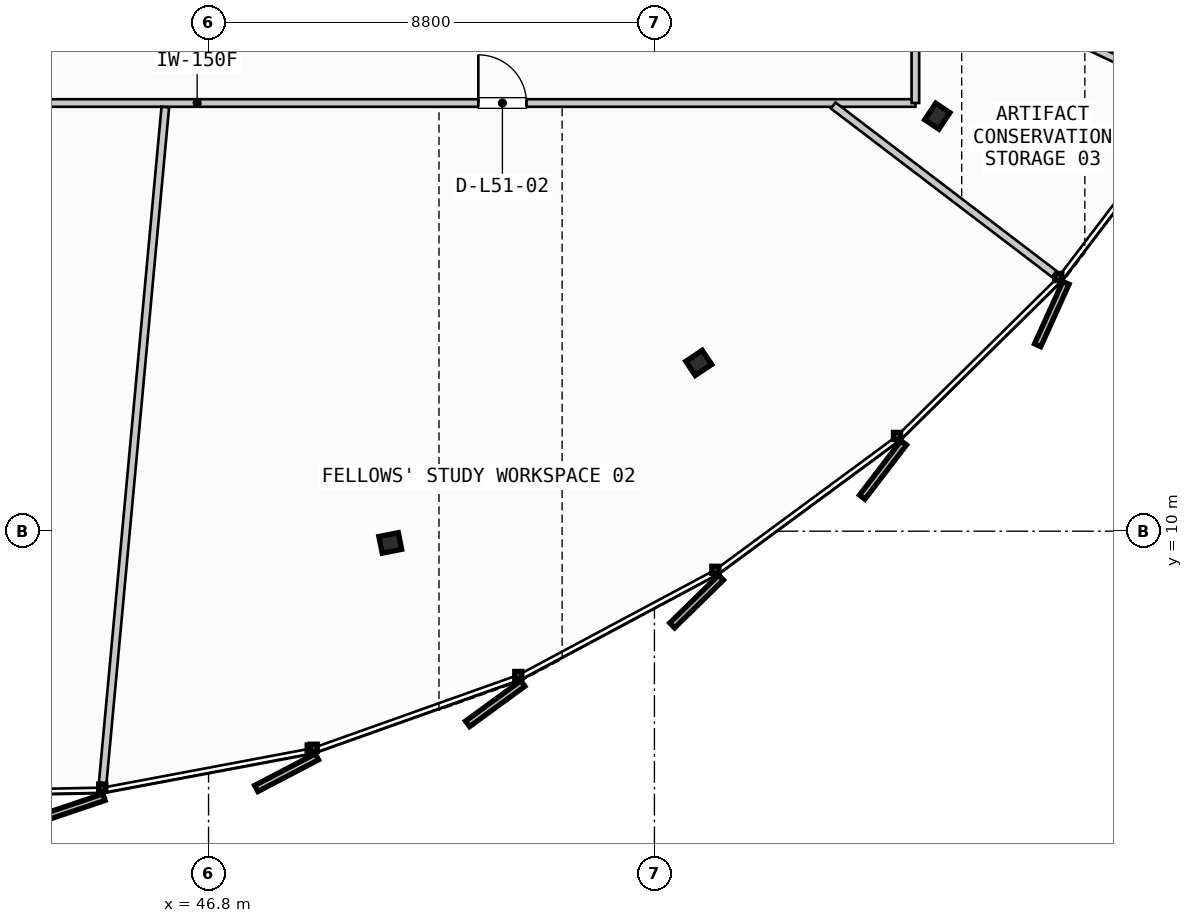
"""IFC4 building model, lengths in metres.
Left out: names, types, materials, properties, quantities, classifications, styles, units other than length and angle.
Written with IfcOpenShell. Run it as: python <this file> out.ifc"""

import sys

from ifc_helpers import new_model, si_unit, direction, frame, frame_2d, origin, origin_2d, place, context, subcontext, project, spatial, rectangle, i_section, extrude, source, transform, mapped, element, fill, save


model = new_model("IFC4")
c1 = context("Model", 3, precision=1e-05, world=origin(), true_north=direction((0.0, 1.0)))
c2 = subcontext(c1, "Body", "Model", "MODEL_VIEW")
j1 = project(units=[si_unit("LENGTHUNIT", "METRE"), si_unit("PLANEANGLEUNIT", "RADIAN")], contexts=[c1])
p1 = place(None, origin())
s1 = spatial("IfcSite", under=j1, at=p1, CompositionType="ELEMENT")
p2 = place(p1, origin())
s2 = spatial("IfcBuilding", under=s1, at=p2, CompositionType="ELEMENT")
p3 = place(p2, frame((0.0, 0.0, 197.4)))
s3 = spatial("IfcBuildingStorey", under=s2, at=p3, CompositionType="ELEMENT", Elevation=197.4)
m1 = source(origin(), c2, "Body", "SweptSolid", [
    extrude(i_section(OverallWidth=0.391, OverallDepth=0.335, WebThickness=0.023, FlangeThickness=0.034, FilletRadius=0.015, at=origin_2d()), origin(), (0.0, 0.0, 1.0), 3.26),
])
for number, where, z_axis, x_axis in (
    (1, (50.387, 9.769, 0.0), (0.0, 0.0, 1.0), (0.195, -0.981, 0.0)),
    (2, (56.475, 13.321, 0.0), (0.0, 0.0, 1.0), (0.556, -0.831, 0.0)),
    (3, (61.183, 18.19, 0.0), (0.0, 0.0, 1.0), (0.831, -0.556, 0.0)),
):
    element("IfcColumn", number, at=place(p3, frame(where, z_axis=z_axis, x_axis=x_axis)), inside=s3, PredefinedType="COLUMN", context=c2, shape_type="MappedRepresentation", body=[
        mapped(m1, transform((0.0, 0.0, 0.0), scale=1.0)),
    ])
p4 = place(p3, frame((32.4, 18.45, 0.0), z_axis=(0.0, 0.0, 1.0), x_axis=(1.0, 0.0, 0.0)))
e4 = element("IfcWall", 4, at=p4, inside=s3, PredefinedType="PARTITIONING", context=c2, shape_type="SweptSolid", body=[
    extrude(rectangle(XDim=28.35, YDim=0.15, at=frame_2d((14.175, 0.0))), origin(), (0.0, 0.0, 1.0), 2.595),
])
p5 = place(p4, frame((6.592, 0.0, 0.0)))
e5 = element("IfcOpeningElement", 5, at=p5, cuts=e4, PredefinedType="OPENING", context=c2, shape_type="SweptSolid", body=[
    extrude(rectangle(XDim=0.95, YDim=2.15, at=frame_2d((0.475, 1.075))), frame((0.0, 0.085, 0.0), z_axis=(0.0, -1.0, 0.0), x_axis=(1.0, 0.0, 0.0)), (0.0, 0.0, 1.0), 0.17),
])
p6 = place(p4, frame((19.725, 0.0, 0.0)))
e6 = element("IfcOpeningElement", 6, at=p6, cuts=e4, PredefinedType="OPENING", context=c2, shape_type="SweptSolid", body=[
    extrude(rectangle(XDim=0.95, YDim=2.15, at=frame_2d((0.475, 1.075))), frame((0.0, 0.085, 0.0), z_axis=(0.0, -1.0, 0.0), x_axis=(1.0, 0.0, 0.0)), (0.0, 0.0, 1.0), 0.17),
])
p7 = place(p3, frame((60.75, 18.45, 0.0), z_axis=(0.0, 0.0, 1.0), x_axis=(0.0, 1.0, 0.0)))
e7 = element("IfcWall", 7, at=p7, inside=s3, PredefinedType="PARTITIONING", context=c2, shape_type="SweptSolid", body=[
    extrude(rectangle(XDim=2.65, YDim=0.15, at=frame_2d((1.325, 0.0))), origin(), (0.0, 0.0, 1.0), 2.595),
])
p8 = place(p7, frame((1.25, 0.0, 0.0)))
e8 = element("IfcOpeningElement", 8, at=p8, cuts=e7, PredefinedType="OPENING", context=c2, shape_type="SweptSolid", body=[
    extrude(rectangle(XDim=0.95, YDim=2.15, at=frame_2d((0.475, 1.075))), frame((0.0, 0.085, 0.0), z_axis=(0.0, -1.0, 0.0), x_axis=(1.0, 0.0, 0.0)), (0.0, 0.0, 1.0), 0.17),
])
p9 = place(p3, frame((45.947, 18.37, 0.0), z_axis=(0.0, 0.0, 1.0), x_axis=(-0.092260145088, -0.995734937435, 0.0)))
e9 = element("IfcWall", 9, at=p9, inside=s3, PredefinedType="PARTITIONING", context=c2, shape_type="SweptSolid", body=[
    extrude(rectangle(XDim=13.39, YDim=0.15, at=frame_2d((6.695, 0.0))), origin(), (0.0, 0.0, 1.0), 2.595),
])
p10 = place(p3, frame((59.128, 18.402, 0.0), z_axis=(0.0, 0.0, 1.0), x_axis=(0.795248813588, -0.606283204853, 0.0)))
e10 = element("IfcWall", 10, at=p10, inside=s3, PredefinedType="PARTITIONING", context=c2, shape_type="SweptSolid", body=[
    extrude(rectangle(XDim=5.486, YDim=0.15, at=frame_2d((2.743, 0.0))), origin(), (0.0, 0.0, 1.0), 2.595),
])
p11 = place(p3, frame((61.007, 21.066, 0.0), z_axis=(0.0, 0.0, 1.0), x_axis=(0.904144945531, -0.427225838954, 0.0)))
e11 = element("IfcWall", 11, at=p11, inside=s3, PredefinedType="PARTITIONING", context=c2, shape_type="SweptSolid", body=[
    extrude(rectangle(XDim=5.733, YDim=0.15, at=frame_2d((2.867, 0.0))), origin(), (0.0, 0.0, 1.0), 2.595),
])
m2 = source(origin(), c2, "Body", "SweptSolid", [
    extrude(rectangle(XDim=0.95, YDim=2.15, at=frame_2d((0.475, 1.075))), frame((0.0, 0.025, 0.0), z_axis=(0.0, -1.0, 0.0), x_axis=(1.0, 0.0, 0.0)), (0.0, 0.0, 1.0), 0.05),
])
p12 = place(p6, origin())
e12 = element("IfcDoor", 12, at=p12, inside=s3, OperationType="SINGLE_SWING_LEFT", PredefinedType="DOOR", context=c2, shape_type="MappedRepresentation", body=[
    mapped(m2, transform((0.0, 0.0, 0.0), scale=1.0)),
])
fill(e6, e12)
save(model, sys.argv[1])
